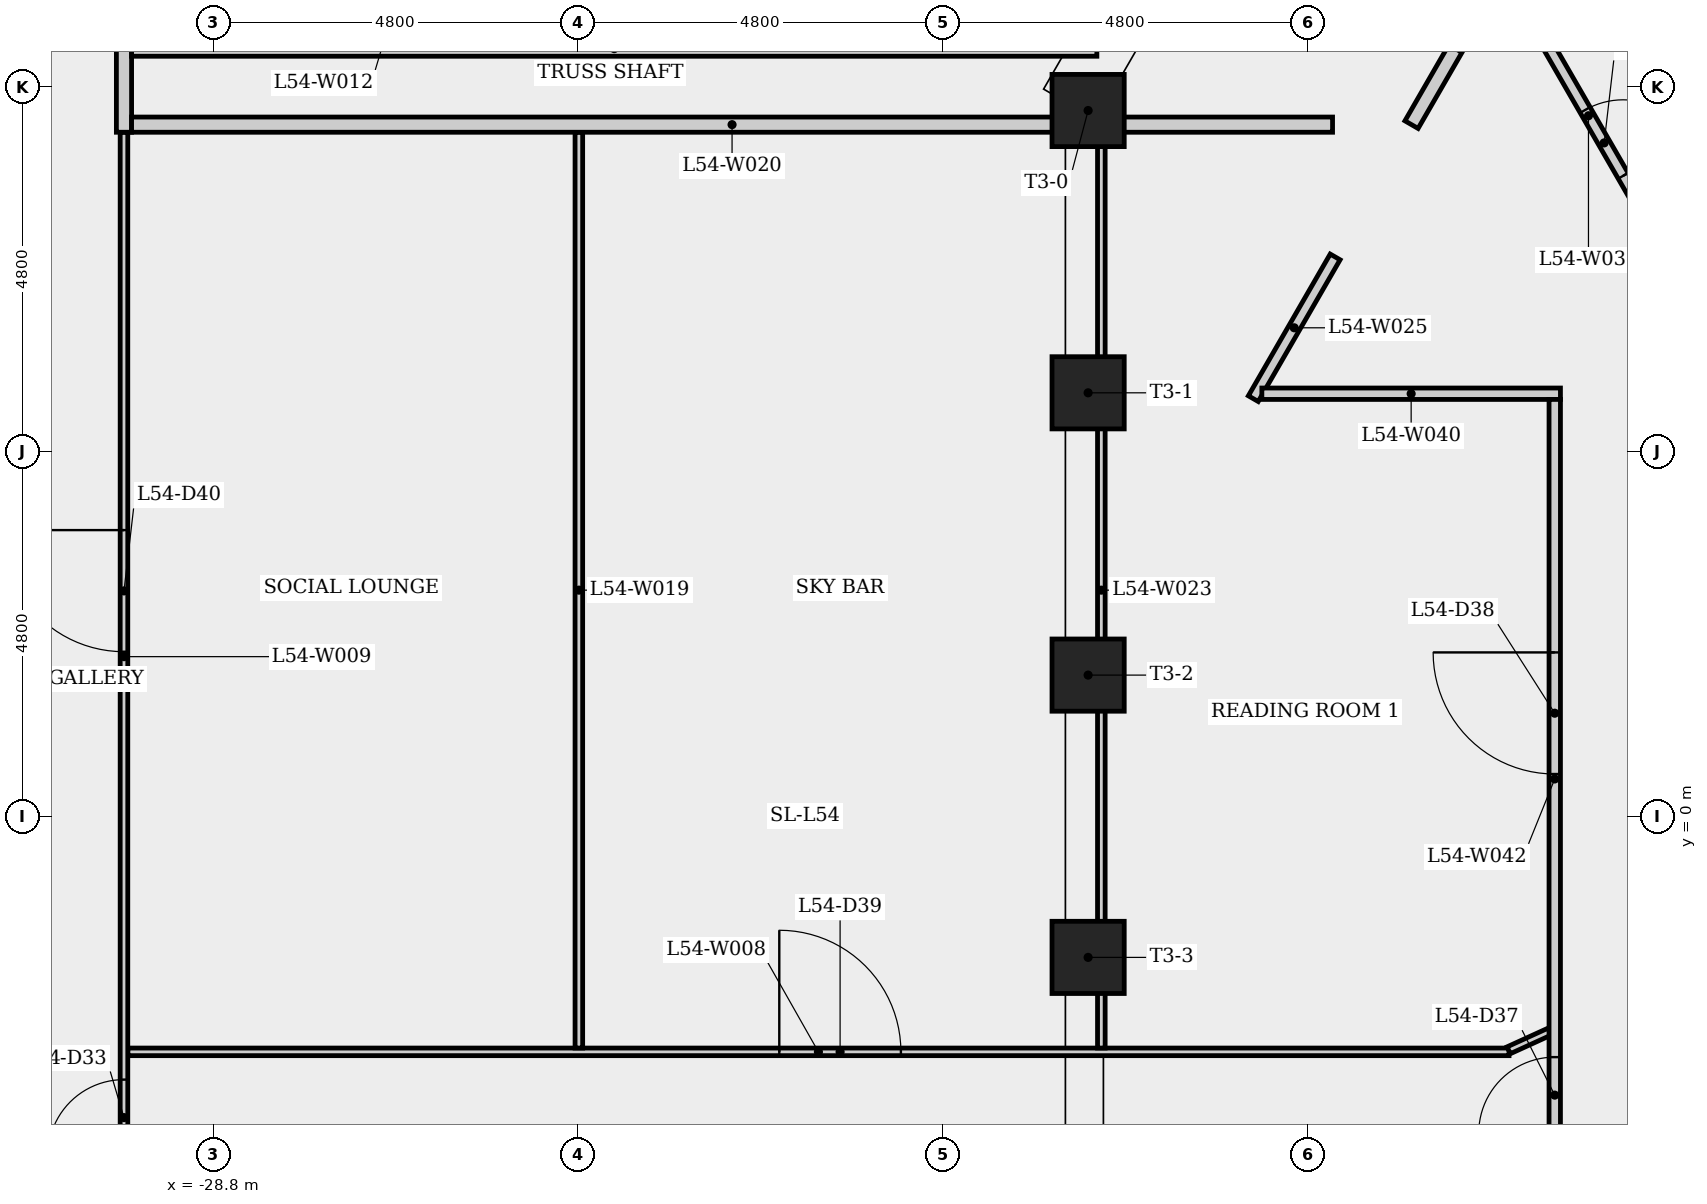
"""IFC4 building model, lengths in metres.
Left out: names, types, materials, properties, quantities, classifications, styles, units other than length and angle.
Written with IfcOpenShell. Run it as: python <this file> out.ifc"""

import sys

from ifc_helpers import new_model, si_unit, direction, frame, frame_2d, origin, origin_2d, place, context, subcontext, project, spatial, rectangle, extrude, element, fill, save


model = new_model("IFC4")
c1 = context("Model", 3, precision=1e-05, world=origin(), true_north=direction((0.0, 1.0)))
c2 = subcontext(c1, "Body", "Model", "MODEL_VIEW")
j1 = project(units=[si_unit("LENGTHUNIT", "METRE"), si_unit("PLANEANGLEUNIT", "RADIAN")], contexts=[c1])
p1 = place(None, origin())
s1 = spatial("IfcSite", under=j1, at=p1, CompositionType="ELEMENT")
p2 = place(p1, origin())
s2 = spatial("IfcBuilding", under=s1, at=p2, CompositionType="ELEMENT")
p3 = place(p2, frame((0.0, 0.0, 202.1)))
s3 = spatial("IfcBuildingStorey", under=s2, at=p3, CompositionType="ELEMENT", Elevation=202.1)
for number, where, z_axis, x_axis in (
    (1, (-17.289, 9.286, 0.0), (0.0, 0.0, 1.0), (-1.0, 0.0, 0.0)),
    (2, (-17.289, 5.572, 0.0), (0.0, 0.0, 1.0), (-1.0, 0.0, 0.0)),
    (3, (-17.289, 1.857, 0.0), (0.0, 0.0, 1.0), (-1.0, 0.0, 0.0)),
    (4, (-17.289, -1.857, 0.0), (0.0, 0.0, 1.0), (-1.0, 0.0, 0.0)),
):
    element("IfcColumn", number, at=place(p3, frame(where, z_axis=z_axis, x_axis=x_axis)), inside=s3, PredefinedType="COLUMN", context=c2, shape_type="SweptSolid", body=[
        extrude(rectangle(XDim=0.95, YDim=0.95, at=origin_2d()), origin(), (0.0, 0.0, 1.0), 4.0),
    ])
p4 = place(p3, frame((-29.924, -3.1, 0.0), z_axis=(0.0, 0.0, 1.0), x_axis=(1.0, 0.0, 0.0)))
e5 = element("IfcWall", 5, at=p4, inside=s3, PredefinedType="PARTITIONING", context=c2, shape_type="SweptSolid", body=[
    extrude(rectangle(XDim=18.173, YDim=0.1, at=frame_2d((9.086, 0.0))), origin(), (0.0, 0.0, 1.0), 3.6),
])
p5 = place(p4, frame((8.572, 0.0, 0.0)))
e6 = element("IfcOpeningElement", 6, at=p5, cuts=e5, PredefinedType="OPENING", context=c2, shape_type="SweptSolid", body=[
    extrude(rectangle(XDim=1.6, YDim=2.1, at=frame_2d((0.8, 1.05))), frame((0.0, 0.06, 0.0), z_axis=(0.0, -1.0, 0.0), x_axis=(1.0, 0.0, 0.0)), (0.0, 0.0, 1.0), 0.12),
])
p6 = place(p3, frame((-29.974, -4.8, 0.0), z_axis=(0.0, 0.0, 1.0), x_axis=(0.0, 1.0, 0.0)))
e7 = element("IfcWall", 7, at=p6, inside=s3, PredefinedType="PARTITIONING", context=c2, shape_type="SweptSolid", body=[
    extrude(rectangle(XDim=13.8, YDim=0.1, at=frame_2d((6.9, 0.0))), origin(), (0.0, 0.0, 1.0), 3.6),
])
p7 = place(p6, frame((0.335, 0.0, 0.0)))
e8 = element("IfcOpeningElement", 8, at=p7, cuts=e7, PredefinedType="OPENING", context=c2, shape_type="SweptSolid", body=[
    extrude(rectangle(XDim=1.0, YDim=2.1, at=frame_2d((0.5, 1.05))), frame((0.0, 0.06, 0.0), z_axis=(0.0, -1.0, 0.0), x_axis=(1.0, 0.0, 0.0)), (0.0, 0.0, 1.0), 0.12),
])
p8 = place(p6, frame((6.965, 0.0, 0.0)))
e9 = element("IfcOpeningElement", 9, at=p8, cuts=e7, PredefinedType="OPENING", context=c2, shape_type="SweptSolid", body=[
    extrude(rectangle(XDim=1.6, YDim=2.1, at=frame_2d((0.8, 1.05))), frame((0.0, 0.06, 0.0), z_axis=(0.0, -1.0, 0.0), x_axis=(1.0, 0.0, 0.0)), (0.0, 0.0, 1.0), 0.12),
])
p9 = place(p3, frame((-29.974, 9.0, 0.0), z_axis=(0.0, 0.0, 1.0), x_axis=(0.0, 1.0, 0.0)))
e10 = element("IfcWall", 10, at=p9, inside=s3, PredefinedType="PLUMBINGWALL", context=c2, shape_type="SweptSolid", body=[
    extrude(rectangle(XDim=1.2, YDim=0.2, at=frame_2d((0.6, 0.0))), origin(), (0.0, 0.0, 1.0), 3.6),
])
p10 = place(p3, frame((-29.874, 10.1, 0.0), z_axis=(0.0, 0.0, 1.0), x_axis=(1.0, 0.0, 0.0)))
e11 = element("IfcWall", 11, at=p10, inside=s3, PredefinedType="PLUMBINGWALL", context=c2, shape_type="SweptSolid", body=[
    extrude(rectangle(XDim=12.7, YDim=0.2, at=frame_2d((6.35, 0.0))), origin(), (0.0, 0.0, 1.0), 3.6),
])
p11 = place(p3, frame((-23.99, -3.05, 0.0), z_axis=(0.0, 0.0, 1.0), x_axis=(0.0, 1.0, 0.0)))
e12 = element("IfcWall", 12, at=p11, inside=s3, PredefinedType="PARTITIONING", context=c2, shape_type="SweptSolid", body=[
    extrude(rectangle(XDim=12.05, YDim=0.1, at=frame_2d((6.025, 0.0))), origin(), (0.0, 0.0, 1.0), 3.6),
])
p12 = place(p3, frame((-29.874, 9.1, 0.0), z_axis=(0.0, 0.0, 1.0), x_axis=(1.0, 0.0, 0.0)))
e13 = element("IfcWall", 13, at=p12, inside=s3, PredefinedType="PLUMBINGWALL", context=c2, shape_type="SweptSolid", body=[
    extrude(rectangle(XDim=15.801, YDim=0.2, at=frame_2d((7.9, 0.0))), origin(), (0.0, 0.0, 1.0), 3.6),
])
p13 = place(p3, frame((-17.115, -3.05, 0.0), z_axis=(0.0, 0.0, 1.0), x_axis=(0.0, 1.0, 0.0)))
e14 = element("IfcWall", 14, at=p13, inside=s3, PredefinedType="PARTITIONING", context=c2, shape_type="SweptSolid", body=[
    extrude(rectangle(XDim=12.05, YDim=0.1, at=frame_2d((6.025, 0.0))), origin(), (0.0, 0.0, 1.0), 2.775),
])
p14 = place(p3, frame((-15.116, 5.494, 0.0), z_axis=(0.0, 0.0, 1.0), x_axis=(0.499918713684, 0.866072329375, 0.0)))
e15 = element("IfcWall", 15, at=p14, inside=s3, PredefinedType="PARTITIONING", context=c2, shape_type="SweptSolid", body=[
    extrude(rectangle(XDim=2.154, YDim=0.15, at=frame_2d((1.077, 0.0))), origin(), (0.0, 0.0, 1.0), 3.6),
])
p15 = place(p3, frame((-13.034, 9.1, 0.0), z_axis=(0.0, 0.0, 1.0), x_axis=(0.500094469721, 0.865970854795, 0.0)))
e16 = element("IfcWall", 16, at=p15, inside=s3, PredefinedType="PLUMBINGWALL", context=c2, shape_type="SweptSolid", body=[
    extrude(rectangle(XDim=1.155, YDim=0.2, at=frame_2d((0.578, 0.0))), origin(), (0.0, 0.0, 1.0), 3.6),
])
p16 = place(p3, frame((-11.836, 11.175, 0.0), z_axis=(0.0, 0.0, 1.0), x_axis=(0.499960863417, -0.866047998122, 0.0)))
e17 = element("IfcWall", 17, at=p16, inside=s3, PredefinedType="PARTITIONING", context=c2, shape_type="SweptSolid", body=[
    extrude(rectangle(XDim=4.521, YDim=0.15, at=frame_2d((2.26, 0.0))), origin(), (0.0, 0.0, 1.0), 3.6),
])
p17 = place(p16, frame((2.173, 0.0, 0.0)))
e18 = element("IfcOpeningElement", 18, at=p17, cuts=e17, PredefinedType="OPENING", context=c2, shape_type="SweptSolid", body=[
    extrude(rectangle(XDim=1.0, YDim=2.1, at=frame_2d((0.5, 1.05))), frame((0.0, 0.085, 0.0), z_axis=(0.0, -1.0, 0.0), x_axis=(1.0, 0.0, 0.0)), (0.0, 0.0, 1.0), 0.17),
])
p18 = place(p3, frame((-11.756, -3.079, 0.0), z_axis=(0.0, 0.0, 1.0), x_axis=(0.909728715425, 0.41520316031, 0.0)))
e19 = element("IfcWall", 19, at=p18, inside=s3, PredefinedType="PARTITIONING", context=c2, shape_type="SweptSolid", body=[
    extrude(rectangle(XDim=0.591, YDim=0.1, at=frame_2d((0.295, 0.0))), origin(), (0.0, 0.0, 1.0), 3.6),
])
p19 = place(p3, frame((-11.075, 5.56, 0.0), z_axis=(0.0, 0.0, 1.0), x_axis=(-1.0, 0.0, 0.0)))
e20 = element("IfcWall", 20, at=p19, inside=s3, PredefinedType="PARTITIONING", context=c2, shape_type="SweptSolid", body=[
    extrude(rectangle(XDim=3.928, YDim=0.15, at=frame_2d((1.964, 0.0))), origin(), (0.0, 0.0, 1.0), 3.6),
])
p20 = place(p3, frame((-11.15, -4.503, 0.0), z_axis=(0.0, 0.0, 1.0), x_axis=(0.0, 1.0, 0.0)))
e21 = element("IfcWall", 21, at=p20, inside=s3, PredefinedType="PARTITIONING", context=c2, shape_type="SweptSolid", body=[
    extrude(rectangle(XDim=9.988, YDim=0.15, at=frame_2d((4.994, 0.0))), origin(), (0.0, 0.0, 1.0), 3.6),
])
p21 = place(p20, frame((0.333, 0.0, 0.0)))
e22 = element("IfcOpeningElement", 22, at=p21, cuts=e21, PredefinedType="OPENING", context=c2, shape_type="SweptSolid", body=[
    extrude(rectangle(XDim=1.0, YDim=2.1, at=frame_2d((0.5, 1.05))), frame((0.0, 0.085, 0.0), z_axis=(0.0, -1.0, 0.0), x_axis=(1.0, 0.0, 0.0)), (0.0, 0.0, 1.0), 0.17),
])
p22 = place(p20, frame((5.059, 0.0, 0.0)))
e23 = element("IfcOpeningElement", 23, at=p22, cuts=e21, PredefinedType="OPENING", context=c2, shape_type="SweptSolid", body=[
    extrude(rectangle(XDim=1.6, YDim=2.1, at=frame_2d((0.8, 1.05))), frame((0.0, 0.085, 0.0), z_axis=(0.0, -1.0, 0.0), x_axis=(1.0, 0.0, 0.0)), (0.0, 0.0, 1.0), 0.17),
])
p23 = place(p3, frame((-6.959, 8.944, 0.0), z_axis=(0.0, 0.0, 1.0), x_axis=(-0.499982511794, 0.866035500369, 0.0)))
e24 = element("IfcWall", 24, at=p23, inside=s3, PredefinedType="PARTITIONING", context=c2, shape_type="SweptSolid", body=[
    extrude(rectangle(XDim=6.962, YDim=0.1, at=frame_2d((3.481, 0.0))), origin(), (0.0, 0.0, 1.0), 3.6),
])
p24 = place(p17, origin())
e25 = element("IfcDoor", 25, at=p24, inside=s3, OperationType="SINGLE_SWING_RIGHT", PredefinedType="DOOR", context=c2, shape_type="SweptSolid", body=[
    extrude(rectangle(XDim=1.0, YDim=2.1, at=frame_2d((0.5, 1.05))), frame((0.0, 0.025, 0.0), z_axis=(0.0, -1.0, 0.0), x_axis=(1.0, 0.0, 0.0)), (0.0, 0.0, 1.0), 0.05),
])
fill(e18, e25)
p25 = place(p7, origin())
e26 = element("IfcDoor", 26, at=p25, inside=s3, OperationType="SINGLE_SWING_LEFT", PredefinedType="DOOR", context=c2, shape_type="SweptSolid", body=[
    extrude(rectangle(XDim=1.0, YDim=2.1, at=frame_2d((0.5, 1.05))), frame((0.0, 0.025, 0.0), z_axis=(0.0, -1.0, 0.0), x_axis=(1.0, 0.0, 0.0)), (0.0, 0.0, 1.0), 0.05),
])
fill(e8, e26)
p26 = place(p21, origin())
e27 = element("IfcDoor", 27, at=p26, inside=s3, OperationType="SINGLE_SWING_LEFT", PredefinedType="DOOR", context=c2, shape_type="SweptSolid", body=[
    extrude(rectangle(XDim=1.0, YDim=2.1, at=frame_2d((0.5, 1.05))), frame((0.0, 0.025, 0.0), z_axis=(0.0, -1.0, 0.0), x_axis=(1.0, 0.0, 0.0)), (0.0, 0.0, 1.0), 0.05),
])
fill(e22, e27)
p27 = place(p22, origin())
e28 = element("IfcDoor", 28, at=p27, inside=s3, OperationType="SINGLE_SWING_RIGHT", PredefinedType="DOOR", context=c2, shape_type="SweptSolid", body=[
    extrude(rectangle(XDim=1.6, YDim=2.1, at=frame_2d((0.8, 1.05))), frame((0.0, 0.025, 0.0), z_axis=(0.0, -1.0, 0.0), x_axis=(1.0, 0.0, 0.0)), (0.0, 0.0, 1.0), 0.05),
])
fill(e23, e28)
p28 = place(p5, origin())
e29 = element("IfcDoor", 29, at=p28, inside=s3, OperationType="SINGLE_SWING_LEFT", PredefinedType="DOOR", context=c2, shape_type="SweptSolid", body=[
    extrude(rectangle(XDim=1.6, YDim=2.1, at=frame_2d((0.8, 1.05))), frame((0.0, 0.025, 0.0), z_axis=(0.0, -1.0, 0.0), x_axis=(1.0, 0.0, 0.0)), (0.0, 0.0, 1.0), 0.05),
])
fill(e6, e29)
p29 = place(p8, origin())
e30 = element("IfcDoor", 30, at=p29, inside=s3, OperationType="SINGLE_SWING_RIGHT", PredefinedType="DOOR", context=c2, shape_type="SweptSolid", body=[
    extrude(rectangle(XDim=1.6, YDim=2.1, at=frame_2d((0.8, 1.05))), frame((0.0, 0.025, 0.0), z_axis=(0.0, -1.0, 0.0), x_axis=(1.0, 0.0, 0.0)), (0.0, 0.0, 1.0), 0.05),
])
fill(e9, e30)
save(model, sys.argv[1])
